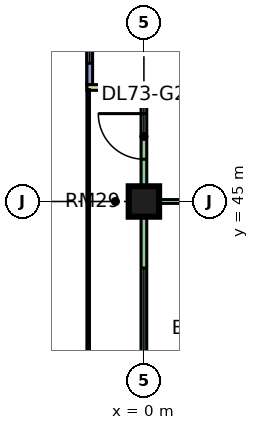
"""IFC4 building model, lengths in metres.
Left out: names, types, materials, properties, quantities, classifications, styles, units other than length and angle.
Written with IfcOpenShell. Run it as: python <this file> out.ifc"""

import sys

from ifc_helpers import new_model, si_unit, direction, frame, frame_2d, origin, origin_2d, place, context, subcontext, project, spatial, rectangle, extrude, element, fill, save


model = new_model("IFC4")
c1 = context("Model", 3, precision=1e-05, world=origin(), true_north=direction((0.0, 1.0)))
c2 = subcontext(c1, "Body", "Model", "MODEL_VIEW")
j1 = project(units=[si_unit("LENGTHUNIT", "METRE"), si_unit("PLANEANGLEUNIT", "RADIAN")], contexts=[c1])
p1 = place(None, origin())
s1 = spatial("IfcSite", under=j1, at=p1, CompositionType="ELEMENT")
p2 = place(p1, origin())
s2 = spatial("IfcBuilding", under=s1, at=p2, CompositionType="ELEMENT")
p3 = place(p2, frame((0.0, 0.0, 310.9)))
s3 = spatial("IfcBuildingStorey", under=s2, at=p3, CompositionType="ELEMENT", Elevation=310.9)
p4 = place(p3, frame((0.0, 45.0, 0.0), z_axis=(0.0, 0.0, 1.0), x_axis=(1.0, 0.0, 0.0)))
e1 = element("IfcColumn", 1, at=p4, inside=s3, PredefinedType="COLUMN", context=c2, shape_type="SweptSolid", body=[
    extrude(rectangle(XDim=0.8, YDim=0.8, at=origin_2d()), origin(), (0.0, 0.0, 1.0), 3.75),
])
p5 = place(p3, frame((-1.425, 52.5, 0.0), z_axis=(0.0, 0.0, 1.0), x_axis=(0.0, -1.0, 0.0)))
e2 = element("IfcWall", 2, at=p5, inside=s3, PredefinedType="SOLIDWALL", context=c2, shape_type="SweptSolid", body=[
    extrude(rectangle(XDim=4.425, YDim=0.15, at=frame_2d((2.212, 0.0))), origin(), (0.0, 0.0, 1.0), 3.35),
])
p6 = place(p5, frame((0.3, 0.0, 0.45)))
e3 = element("IfcOpeningElement", 3, at=p6, cuts=e2, PredefinedType="OPENING", context=c2, shape_type="SweptSolid", body=[
    extrude(rectangle(XDim=0.9, YDim=2.4, at=frame_2d((0.45, 1.2))), frame((0.0, 0.085, 0.0), z_axis=(0.0, -1.0, 0.0), x_axis=(1.0, 0.0, 0.0)), (0.0, 0.0, 1.0), 0.17),
])
p7 = place(p5, frame((2.062, 0.0, 0.45)))
e4 = element("IfcOpeningElement", 4, at=p7, cuts=e2, PredefinedType="OPENING", context=c2, shape_type="SweptSolid", body=[
    extrude(rectangle(XDim=1.8, YDim=2.4, at=frame_2d((0.9, 1.2))), frame((0.0, 0.085, 0.0), z_axis=(0.0, -1.0, 0.0), x_axis=(1.0, 0.0, 0.0)), (0.0, 0.0, 1.0), 0.17),
])
p8 = place(p3, frame((0.0, 47.925, 0.0), z_axis=(0.0, 0.0, 1.0), x_axis=(0.0, -1.0, 0.0)))
e5 = element("IfcWall", 5, at=p8, inside=s3, PredefinedType="SOLIDWALL", context=c2, shape_type="SweptSolid", body=[
    extrude(rectangle(XDim=11.85, YDim=0.15, at=frame_2d((5.925, 0.0))), origin(), (0.0, 0.0, 1.0), 3.35),
])
p9 = place(p8, frame((0.613, 0.0, 0.0)))
e6 = element("IfcOpeningElement", 6, at=p9, cuts=e5, PredefinedType="OPENING", context=c2, shape_type="SweptSolid", body=[
    extrude(rectangle(XDim=1.2, YDim=2.4, at=frame_2d((0.6, 1.2))), frame((0.0, 0.085, 0.0), z_axis=(0.0, -1.0, 0.0), x_axis=(1.0, 0.0, 0.0)), (0.0, 0.0, 1.0), 0.17),
])
p10 = place(p8, frame((4.675, 0.0, 0.45)))
e7 = element("IfcOpeningElement", 7, at=p10, cuts=e5, PredefinedType="OPENING", context=c2, shape_type="SweptSolid", body=[
    extrude(rectangle(XDim=3.0, YDim=2.4, at=frame_2d((1.5, 1.2))), frame((0.0, 0.085, 0.0), z_axis=(0.0, -1.0, 0.0), x_axis=(1.0, 0.0, 0.0)), (0.0, 0.0, 1.0), 0.17),
])
p11 = place(p8, frame((9.275, 0.0, 0.45)))
e8 = element("IfcOpeningElement", 8, at=p11, cuts=e5, PredefinedType="OPENING", context=c2, shape_type="SweptSolid", body=[
    extrude(rectangle(XDim=1.8, YDim=2.4, at=frame_2d((0.9, 1.2))), frame((0.0, 0.085, 0.0), z_axis=(0.0, -1.0, 0.0), x_axis=(1.0, 0.0, 0.0)), (0.0, 0.0, 1.0), 0.17),
])
p12 = place(p3, frame((-1.5, 48.0, 0.0), z_axis=(0.0, 0.0, 1.0), x_axis=(1.0, 0.0, 0.0)))
e9 = element("IfcWall", 9, at=p12, inside=s3, PredefinedType="SOLIDWALL", context=c2, shape_type="SweptSolid", body=[
    extrude(rectangle(XDim=1.5, YDim=0.15, at=frame_2d((0.75, 0.0))), origin(), (0.0, 0.0, 1.0), 3.35),
])
p13 = place(p3, frame((0.0, 48.0, 0.0), z_axis=(0.0, 0.0, 1.0), x_axis=(1.0, 0.0, 0.0)))
e10 = element("IfcWall", 10, at=p13, inside=s3, PredefinedType="PARTITIONING", context=c2, shape_type="SweptSolid", body=[
    extrude(rectangle(XDim=7.075, YDim=0.15, at=frame_2d((3.538, 0.0))), origin(), (0.0, 0.0, 1.0), 3.35),
])
p14 = place(p3, frame((0.074, 45.0, 0.0), z_axis=(0.0, 0.0, 1.0), x_axis=(1.0, 0.0, 0.0)))
e11 = element("IfcWall", 11, at=p14, inside=s3, PredefinedType="PARTITIONING", context=c2, shape_type="SweptSolid", body=[
    extrude(rectangle(XDim=6.851, YDim=0.1, at=frame_2d((3.426, 0.0))), origin(), (0.0, 0.0, 1.0), 3.35),
])
p15 = place(p7, origin())
e12 = element("IfcWindow", 12, at=p15, inside=s3, PartitioningType="SINGLE_PANEL", PredefinedType="WINDOW", context=c2, shape_type="SweptSolid", body=[
    extrude(rectangle(XDim=1.8, YDim=2.4, at=frame_2d((0.9, 1.2))), frame((0.0, 0.03, 0.0), z_axis=(0.0, -1.0, 0.0), x_axis=(1.0, 0.0, 0.0)), (0.0, 0.0, 1.0), 0.06),
])
fill(e4, e12)
p16 = place(p9, frame((1.2, 0.0, 0.0), z_axis=(0.0, 0.0, 1.0), x_axis=(-1.0, 0.0, 0.0)))
e13 = element("IfcDoor", 13, at=p16, inside=s3, OperationType="DOUBLE_DOOR_SINGLE_SWING", PredefinedType="DOOR", context=c2, shape_type="SweptSolid", body=[
    extrude(rectangle(XDim=1.2, YDim=2.4, at=frame_2d((0.6, 1.2))), frame((0.0, 0.025, 0.0), z_axis=(0.0, -1.0, 0.0), x_axis=(1.0, 0.0, 0.0)), (0.0, 0.0, 1.0), 0.05),
])
fill(e6, e13)
p17 = place(p10, origin())
e14 = element("IfcWindow", 14, at=p17, inside=s3, PartitioningType="SINGLE_PANEL", PredefinedType="WINDOW", context=c2, shape_type="SweptSolid", body=[
    extrude(rectangle(XDim=3.0, YDim=2.4, at=frame_2d((1.5, 1.2))), frame((0.0, 0.03, 0.0), z_axis=(0.0, -1.0, 0.0), x_axis=(1.0, 0.0, 0.0)), (0.0, 0.0, 1.0), 0.06),
])
fill(e7, e14)
save(model, sys.argv[1])
